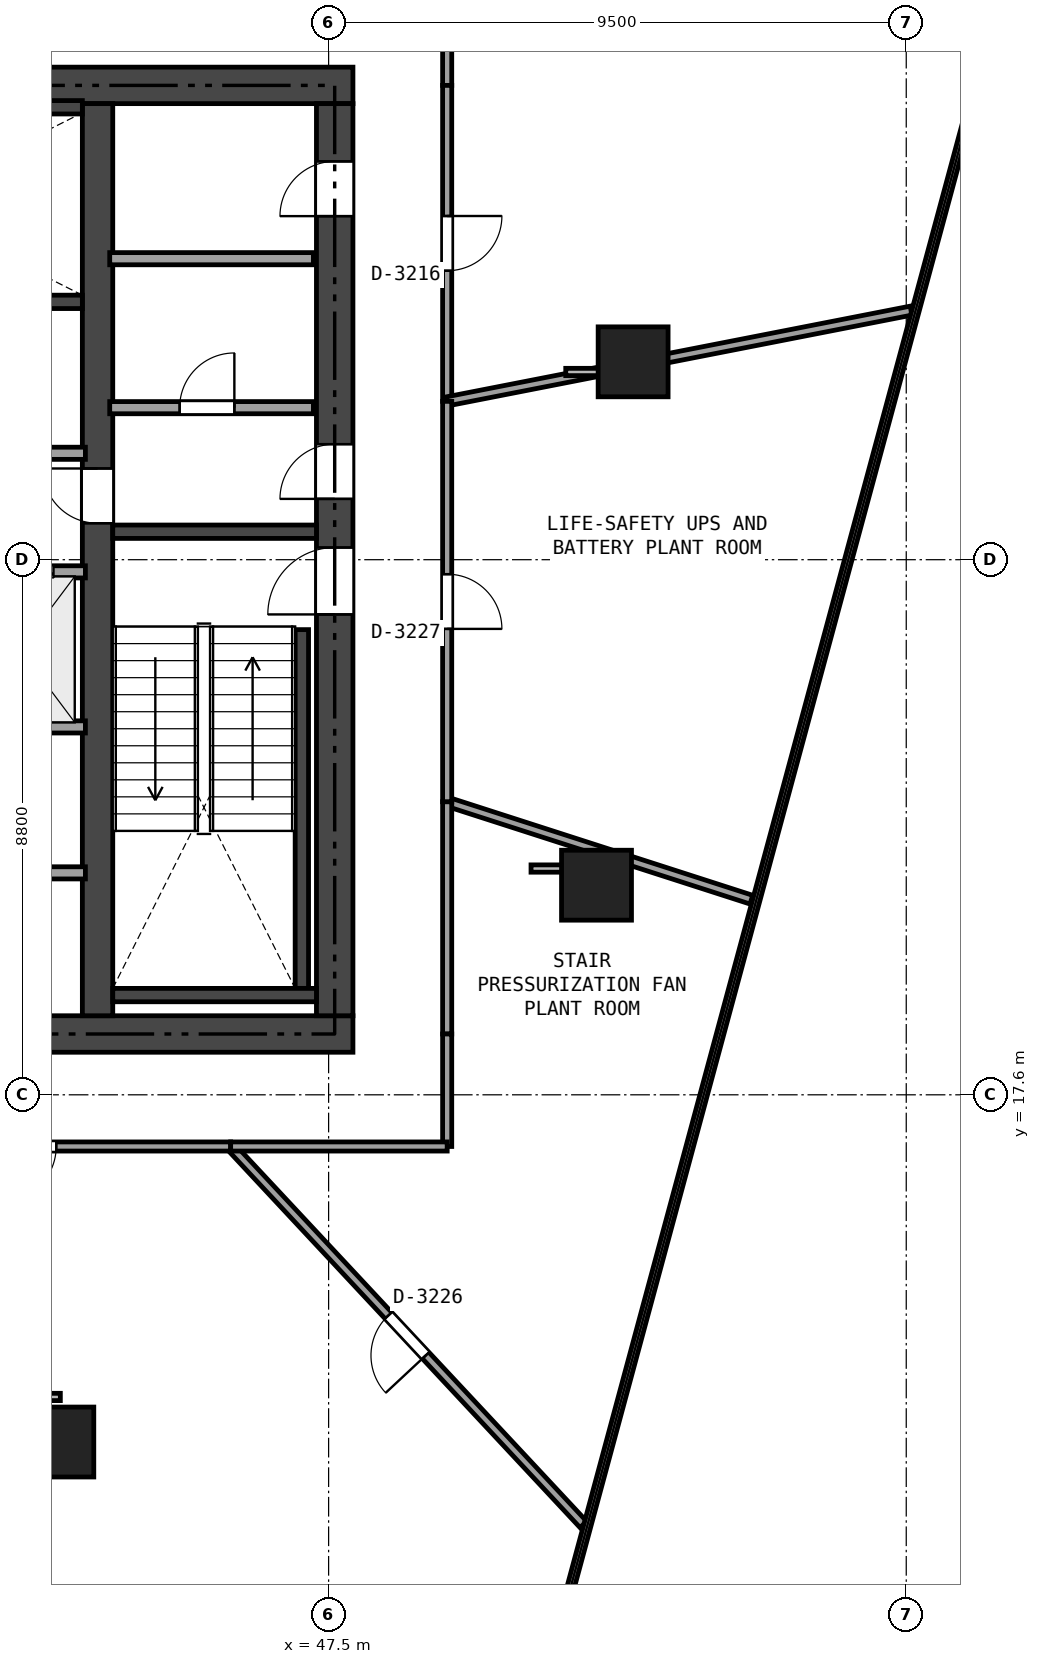
"""IFC4 building model, lengths in metres.
Left out: names, types, materials, properties, quantities, classifications, styles, units other than length and angle.
Written with IfcOpenShell. Run it as: python <this file> out.ifc"""

import sys

from ifc_helpers import new_model, si_unit, direction, frame, frame_2d, origin, origin_2d, place, context, subcontext, project, spatial, rectangle, extrude, element, fill, save


model = new_model("IFC4")
c1 = context("Model", 3, precision=1e-05, world=origin(), true_north=direction((0.0, 1.0)))
c2 = subcontext(c1, "Body", "Model", "MODEL_VIEW")
j1 = project(units=[si_unit("LENGTHUNIT", "METRE"), si_unit("PLANEANGLEUNIT", "RADIAN")], contexts=[c1])
p1 = place(None, origin())
s1 = spatial("IfcSite", under=j1, at=p1, CompositionType="ELEMENT")
p2 = place(p1, origin())
s2 = spatial("IfcBuilding", under=s1, at=p2, CompositionType="ELEMENT")
p3 = place(p2, frame((0.0, 0.0, 121.2)))
s3 = spatial("IfcBuildingStorey", under=s2, at=p3, CompositionType="ELEMENT", Elevation=121.2)
p4 = place(p3, frame((26.5, 18.6, 0.0), z_axis=(0.0, 0.0, 1.0), x_axis=(1.0, 0.0, 0.0)))
e1 = element("IfcWall", 1, at=p4, inside=s3, PredefinedType="SHEAR", context=c2, shape_type="SweptSolid", body=[
    extrude(rectangle(XDim=21.4, YDim=0.6, at=frame_2d((10.7, 0.0))), origin(), (0.0, 0.0, 1.0), 4.08),
])
p5 = place(p4, frame((12.425, 0.0, 0.0)))
e2 = element("IfcOpeningElement", 2, at=p5, cuts=e1, PredefinedType="OPENING", context=c2, shape_type="SweptSolid", body=[
    extrude(rectangle(XDim=1.15, YDim=2.15, at=frame_2d((0.575, 1.075))), frame((0.0, 0.31, 0.0), z_axis=(0.0, -1.0, 0.0), x_axis=(1.0, 0.0, 0.0)), (0.0, 0.0, 1.0), 0.62),
])
p6 = place(p4, frame((5.25, 0.0, 0.0)))
e3 = element("IfcOpeningElement", 3, at=p6, cuts=e1, PredefinedType="OPENING", context=c2, shape_type="SweptSolid", body=[
    extrude(rectangle(XDim=0.9, YDim=2.1, at=frame_2d((0.45, 1.05))), frame((0.0, 0.31, 0.0), z_axis=(0.0, -1.0, 0.0), x_axis=(1.0, 0.0, 0.0)), (0.0, 0.0, 1.0), 0.62),
])
p7 = place(p3, frame((26.5, 34.2, 0.0), z_axis=(0.0, 0.0, 1.0), x_axis=(1.0, 0.0, 0.0)))
e4 = element("IfcWall", 4, at=p7, inside=s3, PredefinedType="SHEAR", context=c2, shape_type="SweptSolid", body=[
    extrude(rectangle(XDim=21.4, YDim=0.6, at=frame_2d((10.7, 0.0))), origin(), (0.0, 0.0, 1.0), 4.08),
])
p8 = place(p7, frame((9.7, 0.0, 0.0)))
e5 = element("IfcOpeningElement", 5, at=p8, cuts=e4, PredefinedType="OPENING", context=c2, shape_type="SweptSolid", body=[
    extrude(rectangle(XDim=1.1, YDim=2.15, at=frame_2d((0.55, 1.075))), frame((0.0, 0.31, 0.0), z_axis=(0.0, -1.0, 0.0), x_axis=(1.0, 0.0, 0.0)), (0.0, 0.0, 1.0), 0.62),
])
p9 = place(p7, frame((1.95, 0.0, 0.0)))
e6 = element("IfcOpeningElement", 6, at=p9, cuts=e4, PredefinedType="OPENING", context=c2, shape_type="SweptSolid", body=[
    extrude(rectangle(XDim=0.9, YDim=2.1, at=frame_2d((0.45, 1.05))), frame((0.0, 0.31, 0.0), z_axis=(0.0, -1.0, 0.0), x_axis=(1.0, 0.0, 0.0)), (0.0, 0.0, 1.0), 0.62),
])
p10 = place(p7, frame((6.25, 0.0, 0.0)))
e7 = element("IfcOpeningElement", 7, at=p10, cuts=e4, PredefinedType="OPENING", context=c2, shape_type="SweptSolid", body=[
    extrude(rectangle(XDim=0.9, YDim=2.1, at=frame_2d((0.45, 1.05))), frame((0.0, 0.31, 0.0), z_axis=(0.0, -1.0, 0.0), x_axis=(1.0, 0.0, 0.0)), (0.0, 0.0, 1.0), 0.62),
])
p11 = place(p3, frame((47.6, 18.9, 0.0), z_axis=(0.0, 0.0, 1.0), x_axis=(0.0, 1.0, 0.0)))
e8 = element("IfcWall", 8, at=p11, inside=s3, PredefinedType="SHEAR", context=c2, shape_type="SweptSolid", body=[
    extrude(rectangle(XDim=15.0, YDim=0.6, at=frame_2d((7.5, 0.0))), origin(), (0.0, 0.0, 1.0), 4.08),
])
p12 = place(p11, frame((6.6, 0.0, 0.0)))
e9 = element("IfcOpeningElement", 9, at=p12, cuts=e8, PredefinedType="OPENING", context=c2, shape_type="SweptSolid", body=[
    extrude(rectangle(XDim=1.1, YDim=2.15, at=frame_2d((0.55, 1.075))), frame((0.0, 0.31, 0.0), z_axis=(0.0, -1.0, 0.0), x_axis=(1.0, 0.0, 0.0)), (0.0, 0.0, 1.0), 0.62),
])
p13 = place(p11, frame((8.5, 0.0, 0.0)))
e10 = element("IfcOpeningElement", 10, at=p13, cuts=e8, PredefinedType="OPENING", context=c2, shape_type="SweptSolid", body=[
    extrude(rectangle(XDim=0.9, YDim=2.1, at=frame_2d((0.45, 1.05))), frame((0.0, 0.31, 0.0), z_axis=(0.0, -1.0, 0.0), x_axis=(1.0, 0.0, 0.0)), (0.0, 0.0, 1.0), 0.62),
])
p14 = place(p11, frame((13.15, 0.0, 0.0)))
e11 = element("IfcOpeningElement", 11, at=p14, cuts=e8, PredefinedType="OPENING", context=c2, shape_type="SweptSolid", body=[
    extrude(rectangle(XDim=0.9, YDim=2.1, at=frame_2d((0.45, 1.05))), frame((0.0, 0.31, 0.0), z_axis=(0.0, -1.0, 0.0), x_axis=(1.0, 0.0, 0.0)), (0.0, 0.0, 1.0), 0.62),
])
p15 = place(p3, frame((43.7, 18.9, 0.0), z_axis=(0.0, 0.0, 1.0), x_axis=(0.0, 1.0, 0.0)))
e12 = element("IfcWall", 12, at=p15, inside=s3, PredefinedType="SHEAR", context=c2, shape_type="SweptSolid", body=[
    extrude(rectangle(XDim=15.0, YDim=0.5, at=frame_2d((7.5, 0.0))), origin(), (0.0, 0.0, 1.0), 4.08),
])
p16 = place(p15, frame((8.1, 0.0, 0.0)))
e13 = element("IfcOpeningElement", 13, at=p16, cuts=e12, PredefinedType="OPENING", context=c2, shape_type="SweptSolid", body=[
    extrude(rectangle(XDim=0.9, YDim=2.1, at=frame_2d((0.45, 1.05))), frame((0.0, 0.26, 0.0), z_axis=(0.0, -1.0, 0.0), x_axis=(1.0, 0.0, 0.0)), (0.0, 0.0, 1.0), 0.52),
])
p17 = place(p3, frame((43.95, 26.86, 0.0), z_axis=(0.0, 0.0, 1.0), x_axis=(1.0, 0.0, 0.0)))
e14 = element("IfcWall", 14, at=p17, inside=s3, PredefinedType="SHEAR", context=c2, shape_type="SweptSolid", body=[
    extrude(rectangle(XDim=3.35, YDim=0.22, at=frame_2d((1.675, 0.0))), origin(), (0.0, 0.0, 1.0), 4.08),
])
p18 = place(p3, frame((47.06, 19.35, 0.0), z_axis=(0.0, 0.0, 1.0), x_axis=(0.0, 1.0, 0.0)))
e15 = element("IfcWall", 15, at=p18, inside=s3, PredefinedType="SHEAR", context=c2, shape_type="SweptSolid", body=[
    extrude(rectangle(XDim=5.9, YDim=0.22, at=frame_2d((2.95, 0.0))), origin(), (0.0, 0.0, 1.0), 4.08),
])
p19 = place(p3, frame((43.95, 19.24, 0.0), z_axis=(0.0, 0.0, 1.0), x_axis=(1.0, 0.0, 0.0)))
e16 = element("IfcWall", 16, at=p19, inside=s3, PredefinedType="SHEAR", context=c2, shape_type="SweptSolid", body=[
    extrude(rectangle(XDim=3.35, YDim=0.22, at=frame_2d((1.675, 0.0))), origin(), (0.0, 0.0, 1.0), 4.08),
])
p20 = place(p3, frame((35.84, 30.64, 0.0), z_axis=(0.0, 0.0, 1.0), x_axis=(1.0, 0.0, 0.0)))
e17 = element("IfcWall", 17, at=p20, inside=s3, PredefinedType="SHEAR", context=c2, shape_type="SweptSolid", body=[
    extrude(rectangle(XDim=7.61, YDim=0.22, at=frame_2d((3.805, 0.0))), origin(), (0.0, 0.0, 1.0), 4.08),
])
p21 = place(p3, frame((37.55, 33.84, 0.0), z_axis=(0.0, 0.0, 1.0), x_axis=(1.0, 0.0, 0.0)))
e18 = element("IfcWall", 18, at=p21, inside=s3, PredefinedType="SHEAR", context=c2, shape_type="SweptSolid", body=[
    extrude(rectangle(XDim=5.9, YDim=0.22, at=frame_2d((2.95, 0.0))), origin(), (0.0, 0.0, 1.0), 4.08),
])
for number, where, z_axis, x_axis in (
    (19, (52.508, 29.654, 0.0), (0.0, 0.0, 1.0), (1.0, 0.0, 0.0)),
    (20, (43.063, 11.89, 0.0), (0.0, 0.0, 1.0), (1.0, 0.0, 0.0)),
    (21, (51.906, 21.047, 0.0), (0.0, 0.0, 1.0), (1.0, 0.0, 0.0)),
):
    element("IfcColumn", number, at=place(p3, frame(where, z_axis=z_axis, x_axis=x_axis)), inside=s3, PredefinedType="COLUMN", context=c2, shape_type="SweptSolid", body=[
        extrude(rectangle(XDim=1.15, YDim=1.15, at=origin_2d()), origin(), (0.0, 0.0, 1.0), 4.08),
    ])
p22 = place(p3, frame((43.9, 28.9, 0.0), z_axis=(0.0, 0.0, 1.0), x_axis=(1.0, 0.0, 0.0)))
e22 = element("IfcWall", 22, at=p22, inside=s3, PredefinedType="SOLIDWALL", context=c2, shape_type="SweptSolid", body=[
    extrude(rectangle(XDim=3.35, YDim=0.2, at=frame_2d((1.675, 0.0))), origin(), (0.0, 0.0, 1.0), 4.08),
])
p23 = place(p22, frame((1.15, 0.0, 0.0)))
e23 = element("IfcOpeningElement", 23, at=p23, cuts=e22, PredefinedType="OPENING", context=c2, shape_type="SweptSolid", body=[
    extrude(rectangle(XDim=0.9, YDim=2.1, at=frame_2d((0.45, 1.05))), frame((0.0, 0.11, 0.0), z_axis=(0.0, -1.0, 0.0), x_axis=(1.0, 0.0, 0.0)), (0.0, 0.0, 1.0), 0.22),
])
p24 = place(p3, frame((43.9, 31.35, 0.0), z_axis=(0.0, 0.0, 1.0), x_axis=(1.0, 0.0, 0.0)))
e24 = element("IfcWall", 24, at=p24, inside=s3, PredefinedType="SOLIDWALL", context=c2, shape_type="SweptSolid", body=[
    extrude(rectangle(XDim=3.35, YDim=0.2, at=frame_2d((1.675, 0.0))), origin(), (0.0, 0.0, 1.0), 4.08),
])
p25 = place(p3, frame((35.62, 28.15, 0.0), z_axis=(0.0, 0.0, 1.0), x_axis=(1.0, 0.0, 0.0)))
e25 = element("IfcWall", 25, at=p25, inside=s3, PredefinedType="SOLIDWALL", context=c2, shape_type="SweptSolid", body=[
    extrude(rectangle(XDim=7.88, YDim=0.2, at=frame_2d((3.94, 0.0))), origin(), (0.0, 0.0, 1.0), 4.08),
])
p26 = place(p3, frame((35.62, 26.2, 0.0), z_axis=(0.0, 0.0, 1.0), x_axis=(1.0, 0.0, 0.0)))
e26 = element("IfcWall", 26, at=p26, inside=s3, PredefinedType="SOLIDWALL", context=c2, shape_type="SweptSolid", body=[
    extrude(rectangle(XDim=7.88, YDim=0.2, at=frame_2d((3.94, 0.0))), origin(), (0.0, 0.0, 1.0), 4.08),
])
p27 = place(p26, frame((0.405, 0.0, 0.0)))
e27 = element("IfcOpeningElement", 27, at=p27, cuts=e26, PredefinedType="OPENING", context=c2, shape_type="SweptSolid", body=[
    extrude(rectangle(XDim=1.1, YDim=2.15, at=frame_2d((0.55, 1.075))), frame((0.0, 0.11, 0.0), z_axis=(0.0, -1.0, 0.0), x_axis=(1.0, 0.0, 0.0)), (0.0, 0.0, 1.0), 0.22),
])
p28 = place(p26, frame((2.355, 0.0, 0.0)))
e28 = element("IfcOpeningElement", 28, at=p28, cuts=e26, PredefinedType="OPENING", context=c2, shape_type="SweptSolid", body=[
    extrude(rectangle(XDim=1.1, YDim=2.15, at=frame_2d((0.55, 1.075))), frame((0.0, 0.11, 0.0), z_axis=(0.0, -1.0, 0.0), x_axis=(1.0, 0.0, 0.0)), (0.0, 0.0, 1.0), 0.22),
])
p29 = place(p26, frame((4.305, 0.0, 0.0)))
e29 = element("IfcOpeningElement", 29, at=p29, cuts=e26, PredefinedType="OPENING", context=c2, shape_type="SweptSolid", body=[
    extrude(rectangle(XDim=1.1, YDim=2.15, at=frame_2d((0.55, 1.075))), frame((0.0, 0.11, 0.0), z_axis=(0.0, -1.0, 0.0), x_axis=(1.0, 0.0, 0.0)), (0.0, 0.0, 1.0), 0.22),
])
p30 = place(p26, frame((6.255, 0.0, 0.0)))
e30 = element("IfcOpeningElement", 30, at=p30, cuts=e26, PredefinedType="OPENING", context=c2, shape_type="SweptSolid", body=[
    extrude(rectangle(XDim=1.1, YDim=2.15, at=frame_2d((0.55, 1.075))), frame((0.0, 0.11, 0.0), z_axis=(0.0, -1.0, 0.0), x_axis=(1.0, 0.0, 0.0)), (0.0, 0.0, 1.0), 0.22),
])
p31 = place(p3, frame((35.62, 23.65, 0.0), z_axis=(0.0, 0.0, 1.0), x_axis=(1.0, 0.0, 0.0)))
e31 = element("IfcWall", 31, at=p31, inside=s3, PredefinedType="SOLIDWALL", context=c2, shape_type="SweptSolid", body=[
    extrude(rectangle(XDim=7.88, YDim=0.2, at=frame_2d((3.94, 0.0))), origin(), (0.0, 0.0, 1.0), 3.601),
])
p32 = place(p3, frame((35.62, 21.25, 0.0), z_axis=(0.0, 0.0, 1.0), x_axis=(1.0, 0.0, 0.0)))
e32 = element("IfcWall", 32, at=p32, inside=s3, PredefinedType="SOLIDWALL", context=c2, shape_type="SweptSolid", body=[
    extrude(rectangle(XDim=7.88, YDim=0.2, at=frame_2d((3.94, 0.0))), origin(), (0.0, 0.0, 1.0), 4.08),
])
p33 = place(p3, frame((49.45, 36.05, 0.0), z_axis=(0.0, 0.0, 1.0), x_axis=(0.0, -1.0, 0.0)))
e33 = element("IfcWall", 33, at=p33, inside=s3, PredefinedType="PARTITIONING", context=c2, shape_type="SweptSolid", body=[
    extrude(rectangle(XDim=1.85, YDim=0.15, at=frame_2d((0.925, 0.0))), origin(), (0.0, 0.0, 1.0), 3.365),
])
p34 = place(p3, frame((49.45, 34.2, 0.0), z_axis=(0.0, 0.0, 1.0), x_axis=(0.0, -1.0, 0.0)))
e34 = element("IfcWall", 34, at=p34, inside=s3, PredefinedType="PARTITIONING", context=c2, shape_type="SweptSolid", body=[
    extrude(rectangle(XDim=5.196, YDim=0.15, at=frame_2d((2.598, 0.0))), origin(), (0.0, 0.0, 1.0), 3.065),
])
p35 = place(p34, frame((2.148, 0.0, 0.0)))
e35 = element("IfcOpeningElement", 35, at=p35, cuts=e34, PredefinedType="OPENING", context=c2, shape_type="SweptSolid", body=[
    extrude(rectangle(XDim=0.9, YDim=2.0, at=frame_2d((0.45, 1.0))), frame((0.0, 0.085, 0.0), z_axis=(0.0, -1.0, 0.0), x_axis=(1.0, 0.0, 0.0)), (0.0, 0.0, 1.0), 0.17),
])
p36 = place(p3, frame((49.45, 29.004, 0.0), z_axis=(0.0, 0.0, 1.0), x_axis=(0.981404103345, 0.191953082647, 0.0)))
e36 = element("IfcWall", 36, at=p36, inside=s3, PredefinedType="PARTITIONING", context=c2, shape_type="SweptSolid", body=[
    extrude(rectangle(XDim=7.774, YDim=0.15, at=frame_2d((3.887, 0.0))), origin(), (0.0, 0.0, 1.0), 3.065),
])
p37 = place(p3, frame((51.69, 10.534, 0.0), z_axis=(0.0, 0.0, 1.0), x_axis=(-0.68227834955, 0.731092506961, 0.0)))
e37 = element("IfcWall", 37, at=p37, inside=s3, PredefinedType="PARTITIONING", context=c2, shape_type="SweptSolid", body=[
    extrude(rectangle(XDim=8.502, YDim=0.15, at=frame_2d((4.251, 0.0))), origin(), (0.0, 0.0, 1.0), 3.365),
])
p38 = place(p37, frame((3.801, 0.0, 0.0)))
e38 = element("IfcOpeningElement", 38, at=p38, cuts=e37, PredefinedType="OPENING", context=c2, shape_type="SweptSolid", body=[
    extrude(rectangle(XDim=0.9, YDim=2.0, at=frame_2d((0.45, 1.0))), frame((0.0, 0.085, 0.0), z_axis=(0.0, -1.0, 0.0), x_axis=(1.0, 0.0, 0.0)), (0.0, 0.0, 1.0), 0.17),
])
p39 = place(p3, frame((45.889, 16.75, 0.0), z_axis=(0.0, 0.0, 1.0), x_axis=(-1.0, 0.0, 0.0)))
e39 = element("IfcWall", 39, at=p39, inside=s3, PredefinedType="PARTITIONING", context=c2, shape_type="SweptSolid", body=[
    extrude(rectangle(XDim=6.638, YDim=0.15, at=frame_2d((3.319, 0.0))), origin(), (0.0, 0.0, 1.0), 3.065),
])
p40 = place(p39, frame((2.869, 0.0, 0.0)))
e40 = element("IfcOpeningElement", 40, at=p40, cuts=e39, PredefinedType="OPENING", context=c2, shape_type="SweptSolid", body=[
    extrude(rectangle(XDim=0.9, YDim=2.0, at=frame_2d((0.45, 1.0))), frame((0.0, 0.085, 0.0), z_axis=(0.0, -1.0, 0.0), x_axis=(1.0, 0.0, 0.0)), (0.0, 0.0, 1.0), 0.17),
])
p41 = place(p3, frame((54.453, 20.809, 0.0), z_axis=(0.0, 0.0, 1.0), x_axis=(-0.95187571798, 0.306484285928, 0.0)))
e41 = element("IfcWall", 41, at=p41, inside=s3, PredefinedType="PARTITIONING", context=c2, shape_type="SweptSolid", body=[
    extrude(rectangle(XDim=5.256, YDim=0.15, at=frame_2d((2.628, 0.0))), origin(), (0.0, 0.0, 1.0), 3.365),
])
p42 = place(p3, frame((49.45, 22.42, 0.0), z_axis=(0.0, 0.0, 1.0), x_axis=(0.0, -1.0, 0.0)))
e42 = element("IfcWall", 42, at=p42, inside=s3, PredefinedType="PARTITIONING", context=c2, shape_type="SweptSolid", body=[
    extrude(rectangle(XDim=3.82, YDim=0.15, at=frame_2d((1.91, 0.0))), origin(), (0.0, 0.0, 1.0), 3.065),
])
p43 = place(p3, frame((49.45, 18.6, 0.0), z_axis=(0.0, 0.0, 1.0), x_axis=(0.0, -1.0, 0.0)))
e43 = element("IfcWall", 43, at=p43, inside=s3, PredefinedType="PARTITIONING", context=c2, shape_type="SweptSolid", body=[
    extrude(rectangle(XDim=1.85, YDim=0.15, at=frame_2d((0.925, 0.0))), origin(), (0.0, 0.0, 1.0), 3.365),
])
p44 = place(p3, frame((49.45, 16.75, 0.0), z_axis=(0.0, 0.0, 1.0), x_axis=(-1.0, 0.0, 0.0)))
e44 = element("IfcWall", 44, at=p44, inside=s3, PredefinedType="PARTITIONING", context=c2, shape_type="SweptSolid", body=[
    extrude(rectangle(XDim=3.561, YDim=0.15, at=frame_2d((1.781, 0.0))), origin(), (0.0, 0.0, 1.0), 3.365),
])
p45 = place(p3, frame((49.45, 29.004, 0.0), z_axis=(0.0, 0.0, 1.0), x_axis=(0.0, -1.0, 0.0)))
e45 = element("IfcWall", 45, at=p45, inside=s3, PredefinedType="PARTITIONING", context=c2, shape_type="SweptSolid", body=[
    extrude(rectangle(XDim=6.584, YDim=0.15, at=frame_2d((3.292, 0.0))), origin(), (0.0, 0.0, 1.0), 3.065),
])
p46 = place(p45, frame((2.842, 0.0, 0.0)))
e46 = element("IfcOpeningElement", 46, at=p46, cuts=e45, PredefinedType="OPENING", context=c2, shape_type="SweptSolid", body=[
    extrude(rectangle(XDim=0.9, YDim=2.0, at=frame_2d((0.45, 1.0))), frame((0.0, 0.085, 0.0), z_axis=(0.0, -1.0, 0.0), x_axis=(1.0, 0.0, 0.0)), (0.0, 0.0, 1.0), 0.17),
])
p47 = place(p12, origin())
e47 = element("IfcDoor", 47, at=p47, inside=s3, OperationType="SINGLE_SWING_LEFT", PredefinedType="DOOR", context=c2, shape_type="SweptSolid", body=[
    extrude(rectangle(XDim=1.1, YDim=2.15, at=frame_2d((0.55, 1.075))), frame((0.0, 0.025, 0.0), z_axis=(0.0, -1.0, 0.0), x_axis=(1.0, 0.0, 0.0)), (0.0, 0.0, 1.0), 0.05),
])
fill(e9, e47)
p48 = place(p16, origin())
e48 = element("IfcDoor", 48, at=p48, inside=s3, OperationType="SINGLE_SWING_RIGHT", PredefinedType="DOOR", context=c2, shape_type="SweptSolid", body=[
    extrude(rectangle(XDim=0.9, YDim=2.1, at=frame_2d((0.45, 1.05))), frame((0.0, 0.025, 0.0), z_axis=(0.0, -1.0, 0.0), x_axis=(1.0, 0.0, 0.0)), (0.0, 0.0, 1.0), 0.05),
])
fill(e13, e48)
p49 = place(p13, origin())
e49 = element("IfcDoor", 49, at=p49, inside=s3, OperationType="SINGLE_SWING_LEFT", PredefinedType="DOOR", context=c2, shape_type="SweptSolid", body=[
    extrude(rectangle(XDim=0.9, YDim=2.1, at=frame_2d((0.45, 1.05))), frame((0.0, 0.025, 0.0), z_axis=(0.0, -1.0, 0.0), x_axis=(1.0, 0.0, 0.0)), (0.0, 0.0, 1.0), 0.05),
])
fill(e10, e49)
p50 = place(p23, origin())
e50 = element("IfcDoor", 50, at=p50, inside=s3, OperationType="SINGLE_SWING_RIGHT", PredefinedType="DOOR", context=c2, shape_type="SweptSolid", body=[
    extrude(rectangle(XDim=0.9, YDim=2.1, at=frame_2d((0.45, 1.05))), frame((0.0, 0.025, 0.0), z_axis=(0.0, -1.0, 0.0), x_axis=(1.0, 0.0, 0.0)), (0.0, 0.0, 1.0), 0.05),
])
fill(e23, e50)
p51 = place(p14, origin())
e51 = element("IfcDoor", 51, at=p51, inside=s3, OperationType="SINGLE_SWING_LEFT", PredefinedType="DOOR", context=c2, shape_type="SweptSolid", body=[
    extrude(rectangle(XDim=0.9, YDim=2.1, at=frame_2d((0.45, 1.05))), frame((0.0, 0.025, 0.0), z_axis=(0.0, -1.0, 0.0), x_axis=(1.0, 0.0, 0.0)), (0.0, 0.0, 1.0), 0.05),
])
fill(e11, e51)
p52 = place(p30, origin())
e52 = element("IfcDoor", 52, at=p52, inside=s3, OperationType="SLIDING_TO_LEFT", PredefinedType="DOOR", context=c2, shape_type="SweptSolid", body=[
    extrude(rectangle(XDim=1.1, YDim=2.15, at=frame_2d((0.55, 1.075))), frame((0.0, 0.025, 0.0), z_axis=(0.0, -1.0, 0.0), x_axis=(1.0, 0.0, 0.0)), (0.0, 0.0, 1.0), 0.05),
])
fill(e30, e52)
p53 = place(p35, origin())
e53 = element("IfcDoor", 53, at=p53, inside=s3, OperationType="SINGLE_SWING_LEFT", PredefinedType="DOOR", context=c2, shape_type="SweptSolid", body=[
    extrude(rectangle(XDim=0.9, YDim=2.0, at=frame_2d((0.45, 1.0))), frame((0.0, 0.025, 0.0), z_axis=(0.0, -1.0, 0.0), x_axis=(1.0, 0.0, 0.0)), (0.0, 0.0, 1.0), 0.05),
])
fill(e35, e53)
p54 = place(p40, origin())
e54 = element("IfcDoor", 54, at=p54, inside=s3, OperationType="SINGLE_SWING_RIGHT", PredefinedType="DOOR", context=c2, shape_type="SweptSolid", body=[
    extrude(rectangle(XDim=0.9, YDim=2.0, at=frame_2d((0.45, 1.0))), frame((0.0, 0.025, 0.0), z_axis=(0.0, -1.0, 0.0), x_axis=(1.0, 0.0, 0.0)), (0.0, 0.0, 1.0), 0.05),
])
fill(e40, e54)
p55 = place(p38, origin())
e55 = element("IfcDoor", 55, at=p55, inside=s3, OperationType="SINGLE_SWING_LEFT", PredefinedType="DOOR", context=c2, shape_type="SweptSolid", body=[
    extrude(rectangle(XDim=0.9, YDim=2.0, at=frame_2d((0.45, 1.0))), frame((0.0, 0.025, 0.0), z_axis=(0.0, -1.0, 0.0), x_axis=(1.0, 0.0, 0.0)), (0.0, 0.0, 1.0), 0.05),
])
fill(e38, e55)
p56 = place(p46, origin())
e56 = element("IfcDoor", 56, at=p56, inside=s3, OperationType="SINGLE_SWING_RIGHT", PredefinedType="DOOR", context=c2, shape_type="SweptSolid", body=[
    extrude(rectangle(XDim=0.9, YDim=2.0, at=frame_2d((0.45, 1.0))), frame((0.0, 0.025, 0.0), z_axis=(0.0, -1.0, 0.0), x_axis=(1.0, 0.0, 0.0)), (0.0, 0.0, 1.0), 0.05),
])
fill(e46, e56)
save(model, sys.argv[1])
